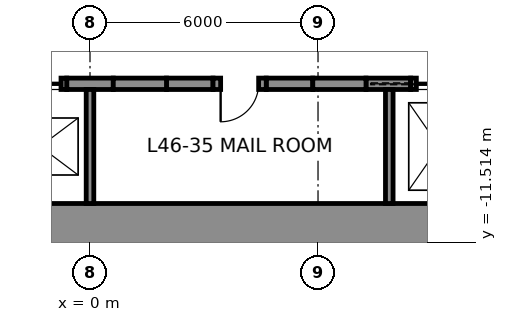
"""IFC4 building model, lengths in metres.
Left out: names, types, materials, properties, quantities, classifications, styles, units other than length and angle.
Written with IfcOpenShell. Run it as: python <this file> out.ifc"""

import sys

from ifc_helpers import new_model, si_unit, direction, frame, frame_2d, origin, place, context, subcontext, project, spatial, rectangle, extrude, element, fill, save


model = new_model("IFC4")
c1 = context("Model", 3, precision=1e-05, world=origin(), true_north=direction((0.0, 1.0)))
c2 = subcontext(c1, "Body", "Model", "MODEL_VIEW")
j1 = project(units=[si_unit("LENGTHUNIT", "METRE"), si_unit("PLANEANGLEUNIT", "RADIAN")], contexts=[c1])
p1 = place(None, origin())
s1 = spatial("IfcSite", under=j1, at=p1, CompositionType="ELEMENT")
p2 = place(p1, origin())
s2 = spatial("IfcBuilding", under=s1, at=p2, CompositionType="ELEMENT")
p3 = place(p2, frame((0.0, 0.0, 213.8)))
s3 = spatial("IfcBuildingStorey", under=s2, at=p3, CompositionType="ELEMENT", Elevation=213.8)
p4 = place(p3, frame((12.0, -11.25, 0.0), z_axis=(0.0, 0.0, 1.0), x_axis=(-1.0, 0.0, 0.0)))
e1 = element("IfcWall", 1, at=p4, inside=s3, PredefinedType="SHEAR", context=c2, shape_type="SweptSolid", body=[
    extrude(rectangle(XDim=24.0, YDim=1.5, at=frame_2d((12.0, 0.0))), origin(), (0.0, 0.0, 1.0), 4.0),
])
for number, where, z_axis, x_axis in (
    (2, (-0.613, -7.35, 0.0), (0.0, 0.0, 1.0), (1.0, 0.0, 0.0)),
    (3, (2.012, -7.35, 0.0), (0.0, 0.0, 1.0), (1.0, 0.0, 0.0)),
    (4, (4.637, -7.35, 0.0), (0.0, 0.0, 1.0), (1.0, 0.0, 0.0)),
):
    element("IfcWall", number, at=place(p3, frame(where, z_axis=z_axis, x_axis=x_axis)), inside=s3, PredefinedType="SHEAR", context=c2, shape_type="SweptSolid", body=[
        extrude(rectangle(XDim=1.225, YDim=0.3, at=frame_2d((0.613, 0.0))), origin(), (0.0, 0.0, 1.0), 4.0),
    ])
p5 = place(p3, frame((7.262, -7.35, 0.0), z_axis=(0.0, 0.0, 1.0), x_axis=(1.0, 0.0, 0.0)))
e5 = element("IfcWall", 5, at=p5, inside=s3, PredefinedType="SHEAR", context=c2, shape_type="SweptSolid", body=[
    extrude(rectangle(XDim=1.175, YDim=0.3, at=frame_2d((0.587, 0.0))), origin(), (0.0, 0.0, 1.0), 4.0),
])
p6 = place(p3, frame((-2.012, -7.35, 0.0), z_axis=(0.0, 0.0, 1.0), x_axis=(1.0, 0.0, 0.0)))
e6 = element("IfcWall", 6, at=p6, inside=s3, PredefinedType="PARTITIONING", context=c2, shape_type="SweptSolid", body=[
    extrude(rectangle(XDim=1.4, YDim=0.3, at=frame_2d((0.7, 0.0))), origin(), (0.0, 0.0, 1.0), 4.0),
])
p7 = place(p6, frame((0.15, 0.0, 0.0)))
e7 = element("IfcOpeningElement", 7, at=p7, cuts=e6, PredefinedType="OPENING", context=c2, shape_type="SweptSolid", body=[
    extrude(rectangle(XDim=1.1, YDim=2.3, at=frame_2d((0.55, 1.15))), frame((0.0, 0.16, 0.0), z_axis=(0.0, -1.0, 0.0), x_axis=(1.0, 0.0, 0.0)), (0.0, 0.0, 1.0), 0.32),
])
p8 = place(p3, frame((0.613, -7.35, 0.0), z_axis=(0.0, 0.0, 1.0), x_axis=(1.0, 0.0, 0.0)))
e8 = element("IfcWall", 8, at=p8, inside=s3, PredefinedType="PARTITIONING", context=c2, shape_type="SweptSolid", body=[
    extrude(rectangle(XDim=1.4, YDim=0.3, at=frame_2d((0.7, 0.0))), origin(), (0.0, 0.0, 1.0), 4.0),
])
p9 = place(p3, frame((3.238, -7.35, 0.0), z_axis=(0.0, 0.0, 1.0), x_axis=(1.0, 0.0, 0.0)))
e9 = element("IfcWall", 9, at=p9, inside=s3, PredefinedType="PARTITIONING", context=c2, shape_type="SweptSolid", body=[
    extrude(rectangle(XDim=1.4, YDim=0.3, at=frame_2d((0.7, 0.0))), origin(), (0.0, 0.0, 1.0), 4.0),
])
p10 = place(p9, frame((0.2, 0.0, 0.0)))
e10 = element("IfcOpeningElement", 10, at=p10, cuts=e9, PredefinedType="OPENING", context=c2, shape_type="SweptSolid", body=[
    extrude(rectangle(XDim=1.0, YDim=2.3, at=frame_2d((0.5, 1.15))), frame((0.0, 0.16, 0.0), z_axis=(0.0, -1.0, 0.0), x_axis=(1.0, 0.0, 0.0)), (0.0, 0.0, 1.0), 0.32),
])
p11 = place(p3, frame((5.863, -7.35, 0.0), z_axis=(0.0, 0.0, 1.0), x_axis=(1.0, 0.0, 0.0)))
e11 = element("IfcWall", 11, at=p11, inside=s3, PredefinedType="PARTITIONING", context=c2, shape_type="SweptSolid", body=[
    extrude(rectangle(XDim=1.4, YDim=0.3, at=frame_2d((0.7, 0.0))), origin(), (0.0, 0.0, 1.0), 4.0),
])
p12 = place(p3, frame((8.438, -7.35, 0.0), z_axis=(0.0, 0.0, 1.0), x_axis=(1.0, 0.0, 0.0)))
e12 = element("IfcWall", 12, at=p12, inside=s3, PredefinedType="PARTITIONING", context=c2, shape_type="SweptSolid", body=[
    extrude(rectangle(XDim=1.5, YDim=0.3, at=frame_2d((0.75, 0.0))), origin(), (0.0, 0.0, 1.0), 4.0),
])
p13 = place(p12, frame((0.15, 0.0, 0.0)))
e13 = element("IfcOpeningElement", 13, at=p13, cuts=e12, PredefinedType="OPENING", context=c2, shape_type="SweptSolid", body=[
    extrude(rectangle(XDim=1.2, YDim=2.3, at=frame_2d((0.6, 1.15))), frame((0.0, 0.16, 0.0), z_axis=(0.0, -1.0, 0.0), x_axis=(1.0, 0.0, 0.0)), (0.0, 0.0, 1.0), 0.32),
])
for number, where, z_axis, x_axis in (
    (14, (0.0, -10.5, 0.0), (0.0, 0.0, 1.0), (0.0, 1.0, 0.0)),
    (15, (7.875, -10.5, 0.0), (0.0, 0.0, 1.0), (0.0, 1.0, 0.0)),
):
    element("IfcWall", number, at=place(p3, frame(where, z_axis=z_axis, x_axis=x_axis)), inside=s3, PredefinedType="PARTITIONING", context=c2, shape_type="SweptSolid", body=[
        extrude(rectangle(XDim=3.0, YDim=0.2, at=frame_2d((1.5, 0.0))), origin(), (0.0, 0.0, 1.0), 4.0),
    ])
p14 = place(p10, frame((1.0, 0.0, 0.0), z_axis=(0.0, 0.0, 1.0), x_axis=(-1.0, 0.0, 0.0)))
e16 = element("IfcDoor", 16, at=p14, inside=s3, OperationType="SINGLE_SWING_RIGHT", PredefinedType="DOOR", context=c2, shape_type="SweptSolid", body=[
    extrude(rectangle(XDim=1.0, YDim=2.3, at=frame_2d((0.5, 1.15))), frame((0.0, 0.025, 0.0), z_axis=(0.0, -1.0, 0.0), x_axis=(1.0, 0.0, 0.0)), (0.0, 0.0, 1.0), 0.05),
])
fill(e10, e16)
p15 = place(p13, origin())
e17 = element("IfcDoor", 17, at=p15, inside=s3, OperationType="SLIDING_TO_LEFT", PredefinedType="DOOR", context=c2, shape_type="SweptSolid", body=[
    extrude(rectangle(XDim=1.2, YDim=2.3, at=frame_2d((0.6, 1.15))), frame((0.0, 0.025, 0.0), z_axis=(0.0, -1.0, 0.0), x_axis=(1.0, 0.0, 0.0)), (0.0, 0.0, 1.0), 0.05),
])
fill(e13, e17)
p16 = place(p7, origin())
e18 = element("IfcDoor", 18, at=p16, inside=s3, OperationType="SLIDING_TO_LEFT", PredefinedType="DOOR", context=c2, shape_type="SweptSolid", body=[
    extrude(rectangle(XDim=1.1, YDim=2.3, at=frame_2d((0.55, 1.15))), frame((0.0, 0.025, 0.0), z_axis=(0.0, -1.0, 0.0), x_axis=(1.0, 0.0, 0.0)), (0.0, 0.0, 1.0), 0.05),
])
fill(e7, e18)
save(model, sys.argv[1])
